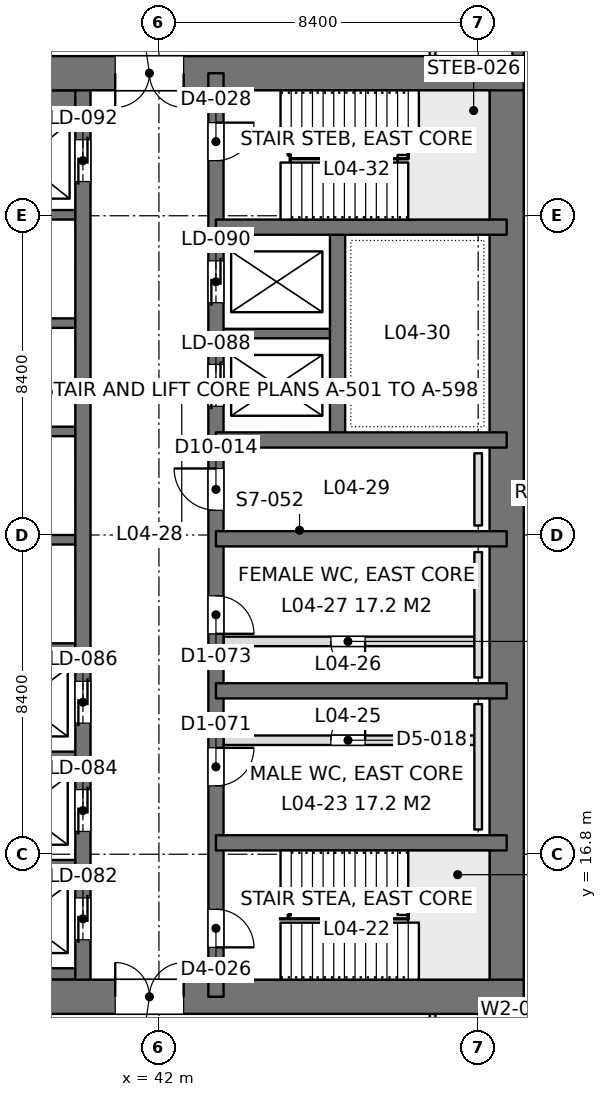
"""IFC4 building model, lengths in metres.
Left out: names, types, materials, properties, quantities, classifications, styles, units other than length and angle.
Written with IfcOpenShell. Run it as: python <this file> out.ifc"""

import sys

from ifc_helpers import new_model, si_unit, direction, frame, frame_2d, origin, place, context, subcontext, project, spatial, rectangle, extrude, element, fill, save


model = new_model("IFC4")
c1 = context("Model", 3, precision=1e-05, world=origin(), true_north=direction((0.0, 1.0)))
c2 = subcontext(c1, "Body", "Model", "MODEL_VIEW")
j1 = project(units=[si_unit("LENGTHUNIT", "METRE"), si_unit("PLANEANGLEUNIT", "RADIAN")], contexts=[c1])
p1 = place(None, origin())
s1 = spatial("IfcSite", under=j1, at=p1, CompositionType="ELEMENT")
p2 = place(p1, origin())
s2 = spatial("IfcBuilding", under=s1, at=p2, CompositionType="ELEMENT")
p3 = place(p2, frame((0.0, 0.0, 18.9)))
s3 = spatial("IfcBuildingStorey", under=s2, at=p3, CompositionType="ELEMENT", Elevation=18.9)
p4 = place(p3, frame((33.6, 13.05, 0.0), z_axis=(0.0, 0.0, 1.0), x_axis=(1.0, 0.0, 0.0)))
e1 = element("IfcWall", 1, at=p4, inside=s3, PredefinedType="SHEAR", context=c2, shape_type="SweptSolid", body=[
    extrude(rectangle(XDim=18.0, YDim=0.9, at=frame_2d((9.0, 0.0))), origin(), (0.0, 0.0, 1.0), 4.5),
])
p5 = place(p4, frame((7.25, 0.0, 0.0)))
e2 = element("IfcOpeningElement", 2, at=p5, cuts=e1, PredefinedType="OPENING", context=c2, shape_type="SweptSolid", body=[
    extrude(rectangle(XDim=1.8, YDim=2.4, at=frame_2d((0.9, 1.2))), frame((0.0, 0.46, 0.0), z_axis=(0.0, -1.0, 0.0), x_axis=(1.0, 0.0, 0.0)), (0.0, 0.0, 1.0), 0.92),
])
p6 = place(p3, frame((33.6, 37.35, 0.0), z_axis=(0.0, 0.0, 1.0), x_axis=(1.0, 0.0, 0.0)))
e3 = element("IfcWall", 3, at=p6, inside=s3, PredefinedType="SHEAR", context=c2, shape_type="SweptSolid", body=[
    extrude(rectangle(XDim=18.0, YDim=0.9, at=frame_2d((9.0, 0.0))), origin(), (0.0, 0.0, 1.0), 4.5),
])
p7 = place(p6, frame((7.25, 0.0, 0.0)))
e4 = element("IfcOpeningElement", 4, at=p7, cuts=e3, PredefinedType="OPENING", context=c2, shape_type="SweptSolid", body=[
    extrude(rectangle(XDim=1.8, YDim=2.4, at=frame_2d((0.9, 1.2))), frame((0.0, 0.46, 0.0), z_axis=(0.0, -1.0, 0.0), x_axis=(1.0, 0.0, 0.0)), (0.0, 0.0, 1.0), 0.92),
])
p8 = place(p3, frame((51.15, 13.05, 0.0), z_axis=(0.0, 0.0, 1.0), x_axis=(0.0, 1.0, 0.0)))
e5 = element("IfcWall", 5, at=p8, inside=s3, PredefinedType="SHEAR", context=c2, shape_type="SweptSolid", body=[
    extrude(rectangle(XDim=24.3, YDim=0.9, at=frame_2d((12.15, 0.0))), origin(), (0.0, 0.0, 1.0), 4.5),
])
p9 = place(p3, frame((43.5, 13.05, 0.0), z_axis=(0.0, 0.0, 1.0), x_axis=(0.0, 1.0, 0.0)))
e6 = element("IfcWall", 6, at=p9, inside=s3, PredefinedType="SHEAR", context=c2, shape_type="SweptSolid", body=[
    extrude(rectangle(XDim=24.3, YDim=0.4, at=frame_2d((12.15, 0.0))), origin(), (0.0, 0.0, 1.0), 4.5),
])
p10 = place(p9, frame((1.3, 0.0, 0.0)))
e7 = element("IfcOpeningElement", 7, at=p10, cuts=e6, PredefinedType="OPENING", context=c2, shape_type="SweptSolid", body=[
    extrude(rectangle(XDim=1.0, YDim=2.2, at=frame_2d((0.5, 1.1))), frame((0.0, 0.21, 0.0), z_axis=(0.0, -1.0, 0.0), x_axis=(1.0, 0.0, 0.0)), (0.0, 0.0, 1.0), 0.42),
])
p11 = place(p9, frame((22.0, 0.0, 0.0)))
e8 = element("IfcOpeningElement", 8, at=p11, cuts=e6, PredefinedType="OPENING", context=c2, shape_type="SweptSolid", body=[
    extrude(rectangle(XDim=1.0, YDim=2.2, at=frame_2d((0.5, 1.1))), frame((0.0, 0.21, 0.0), z_axis=(0.0, -1.0, 0.0), x_axis=(1.0, 0.0, 0.0)), (0.0, 0.0, 1.0), 0.42),
])
p12 = place(p9, frame((5.55, 0.0, 0.0)))
e9 = element("IfcOpeningElement", 9, at=p12, cuts=e6, PredefinedType="OPENING", context=c2, shape_type="SweptSolid", body=[
    extrude(rectangle(XDim=1.0, YDim=2.2, at=frame_2d((0.5, 1.1))), frame((0.0, 0.21, 0.0), z_axis=(0.0, -1.0, 0.0), x_axis=(1.0, 0.0, 0.0)), (0.0, 0.0, 1.0), 0.42),
])
p13 = place(p9, frame((9.55, 0.0, 0.0)))
e10 = element("IfcOpeningElement", 10, at=p13, cuts=e6, PredefinedType="OPENING", context=c2, shape_type="SweptSolid", body=[
    extrude(rectangle(XDim=1.0, YDim=2.2, at=frame_2d((0.5, 1.1))), frame((0.0, 0.21, 0.0), z_axis=(0.0, -1.0, 0.0), x_axis=(1.0, 0.0, 0.0)), (0.0, 0.0, 1.0), 0.42),
])
p14 = place(p9, frame((12.8, 0.0, 0.0)))
e11 = element("IfcOpeningElement", 11, at=p14, cuts=e6, PredefinedType="OPENING", context=c2, shape_type="SweptSolid", body=[
    extrude(rectangle(XDim=1.1, YDim=2.2, at=frame_2d((0.55, 1.1))), frame((0.0, 0.21, 0.0), z_axis=(0.0, -1.0, 0.0), x_axis=(1.0, 0.0, 0.0)), (0.0, 0.0, 1.0), 0.42),
])
p15 = place(p9, frame((15.538, 0.0, 0.0)))
e12 = element("IfcOpeningElement", 12, at=p15, cuts=e6, PredefinedType="OPENING", context=c2, shape_type="SweptSolid", body=[
    extrude(rectangle(XDim=1.1, YDim=2.2, at=frame_2d((0.55, 1.1))), frame((0.0, 0.21, 0.0), z_axis=(0.0, -1.0, 0.0), x_axis=(1.0, 0.0, 0.0)), (0.0, 0.0, 1.0), 0.42),
])
p16 = place(p9, frame((18.262, 0.0, 0.0)))
e13 = element("IfcOpeningElement", 13, at=p16, cuts=e6, PredefinedType="OPENING", context=c2, shape_type="SweptSolid", body=[
    extrude(rectangle(XDim=1.1, YDim=2.2, at=frame_2d((0.55, 1.1))), frame((0.0, 0.21, 0.0), z_axis=(0.0, -1.0, 0.0), x_axis=(1.0, 0.0, 0.0)), (0.0, 0.0, 1.0), 0.42),
])
p17 = place(p3, frame((40.0, 13.05, 0.0), z_axis=(0.0, 0.0, 1.0), x_axis=(0.0, 1.0, 0.0)))
e14 = element("IfcWall", 14, at=p17, inside=s3, PredefinedType="SHEAR", context=c2, shape_type="SweptSolid", body=[
    extrude(rectangle(XDim=24.3, YDim=0.4, at=frame_2d((12.15, 0.0))), origin(), (0.0, 0.0, 1.0), 4.5),
])
p18 = place(p17, frame((1.5, 0.0, 0.0)))
e15 = element("IfcOpeningElement", 15, at=p18, cuts=e14, PredefinedType="OPENING", context=c2, shape_type="SweptSolid", body=[
    extrude(rectangle(XDim=1.1, YDim=2.2, at=frame_2d((0.55, 1.1))), frame((0.0, 0.21, 0.0), z_axis=(0.0, -1.0, 0.0), x_axis=(1.0, 0.0, 0.0)), (0.0, 0.0, 1.0), 0.42),
])
p19 = place(p17, frame((4.35, 0.0, 0.0)))
e16 = element("IfcOpeningElement", 16, at=p19, cuts=e14, PredefinedType="OPENING", context=c2, shape_type="SweptSolid", body=[
    extrude(rectangle(XDim=1.1, YDim=2.2, at=frame_2d((0.55, 1.1))), frame((0.0, 0.21, 0.0), z_axis=(0.0, -1.0, 0.0), x_axis=(1.0, 0.0, 0.0)), (0.0, 0.0, 1.0), 0.42),
])
p20 = place(p17, frame((7.2, 0.0, 0.0)))
e17 = element("IfcOpeningElement", 17, at=p20, cuts=e14, PredefinedType="OPENING", context=c2, shape_type="SweptSolid", body=[
    extrude(rectangle(XDim=1.1, YDim=2.2, at=frame_2d((0.55, 1.1))), frame((0.0, 0.21, 0.0), z_axis=(0.0, -1.0, 0.0), x_axis=(1.0, 0.0, 0.0)), (0.0, 0.0, 1.0), 0.42),
])
p21 = place(p17, frame((21.45, 0.0, 0.0)))
e18 = element("IfcOpeningElement", 18, at=p21, cuts=e14, PredefinedType="OPENING", context=c2, shape_type="SweptSolid", body=[
    extrude(rectangle(XDim=1.1, YDim=2.2, at=frame_2d((0.55, 1.1))), frame((0.0, 0.21, 0.0), z_axis=(0.0, -1.0, 0.0), x_axis=(1.0, 0.0, 0.0)), (0.0, 0.0, 1.0), 0.42),
])
for number, where, z_axis, x_axis in (
    (19, (51.15, 17.1, 0.0), (0.0, 0.0, 1.0), (-1.0, 0.0, 0.0)),
    (20, (51.15, 21.1, 0.0), (0.0, 0.0, 1.0), (-1.0, 0.0, 0.0)),
    (21, (51.15, 25.1, 0.0), (0.0, 0.0, 1.0), (-1.0, 0.0, 0.0)),
    (22, (51.15, 27.7, 0.0), (0.0, 0.0, 1.0), (-1.0, 0.0, 0.0)),
    (23, (51.15, 33.3, 0.0), (0.0, 0.0, 1.0), (-1.0, 0.0, 0.0)),
):
    element("IfcWall", number, at=place(p3, frame(where, z_axis=z_axis, x_axis=x_axis)), inside=s3, PredefinedType="SHEAR", context=c2, shape_type="SweptSolid", body=[
        extrude(rectangle(XDim=7.65, YDim=0.4, at=frame_2d((3.825, 0.0))), origin(), (0.0, 0.0, 1.0), 4.5),
    ])
p22 = place(p3, frame((46.7, 27.7, 0.0), z_axis=(0.0, 0.0, 1.0), x_axis=(0.0, 1.0, 0.0)))
e24 = element("IfcWall", 24, at=p22, inside=s3, PredefinedType="SHEAR", context=c2, shape_type="SweptSolid", body=[
    extrude(rectangle(XDim=5.6, YDim=0.4, at=frame_2d((2.8, 0.0))), origin(), (0.0, 0.0, 1.0), 4.5),
])
p23 = place(p3, frame((46.7, 30.5, 0.0), z_axis=(0.0, 0.0, 1.0), x_axis=(-1.0, 0.0, 0.0)))
e25 = element("IfcWall", 25, at=p23, inside=s3, PredefinedType="SHEAR", context=c2, shape_type="SweptSolid", body=[
    extrude(rectangle(XDim=3.2, YDim=0.25, at=frame_2d((1.6, 0.0))), origin(), (0.0, 0.0, 1.0), 4.5),
])
p24 = place(p3, frame((40.0, 13.65, 0.0), z_axis=(0.0, 0.0, 1.0), x_axis=(-1.0, 0.0, 0.0)))
e26 = element("IfcWall", 26, at=p24, inside=s3, PredefinedType="SHEAR", context=c2, shape_type="SweptSolid", body=[
    extrude(rectangle(XDim=3.2, YDim=0.3, at=frame_2d((1.6, 0.0))), origin(), (0.0, 0.0, 1.0), 4.5),
])
for number, where, z_axis, x_axis in (
    (27, (40.0, 16.525, 0.0), (0.0, 0.0, 1.0), (-1.0, 0.0, 0.0)),
    (28, (40.0, 19.375, 0.0), (0.0, 0.0, 1.0), (-1.0, 0.0, 0.0)),
    (29, (40.0, 22.225, 0.0), (0.0, 0.0, 1.0), (-1.0, 0.0, 0.0)),
    (30, (40.0, 25.075, 0.0), (0.0, 0.0, 1.0), (-1.0, 0.0, 0.0)),
    (31, (40.0, 27.925, 0.0), (0.0, 0.0, 1.0), (-1.0, 0.0, 0.0)),
    (32, (40.0, 30.775, 0.0), (0.0, 0.0, 1.0), (-1.0, 0.0, 0.0)),
    (33, (40.0, 33.625, 0.0), (0.0, 0.0, 1.0), (-1.0, 0.0, 0.0)),
):
    element("IfcWall", number, at=place(p3, frame(where, z_axis=z_axis, x_axis=x_axis)), inside=s3, PredefinedType="SHEAR", context=c2, shape_type="SweptSolid", body=[
        extrude(rectangle(XDim=3.2, YDim=0.25, at=frame_2d((1.6, 0.0))), origin(), (0.0, 0.0, 1.0), 4.5),
    ])
p25 = place(p3, frame((40.0, 36.625, 0.0), z_axis=(0.0, 0.0, 1.0), x_axis=(-1.0, 0.0, 0.0)))
e34 = element("IfcWall", 34, at=p25, inside=s3, PredefinedType="SHEAR", context=c2, shape_type="SweptSolid", body=[
    extrude(rectangle(XDim=3.2, YDim=0.55, at=frame_2d((1.6, 0.0))), origin(), (0.0, 0.0, 1.0), 4.5),
])
p26 = place(p3, frame((51.45, 42.0, 0.0), z_axis=(0.0, 0.0, 1.0), x_axis=(0.0, -1.0, 0.0)))
e35 = element("IfcWall", 35, at=p26, inside=s3, PredefinedType="SOLIDWALL", context=c2, shape_type="SweptSolid", body=[
    extrude(rectangle(XDim=4.2, YDim=0.3, at=frame_2d((2.1, 0.0))), origin(), (0.0, 0.0, 1.0), 4.34),
])
p27 = place(p26, frame((0.9, 0.0, 0.9)))
e36 = element("IfcOpeningElement", 36, at=p27, cuts=e35, PredefinedType="OPENING", context=c2, shape_type="SweptSolid", body=[
    extrude(rectangle(XDim=2.4, YDim=1.9, at=frame_2d((1.2, 0.95))), frame((0.0, 0.16, 0.0), z_axis=(0.0, -1.0, 0.0), x_axis=(1.0, 0.0, 0.0)), (0.0, 0.0, 1.0), 0.32),
])
p28 = place(p3, frame((51.45, 12.6, 0.0), z_axis=(0.0, 0.0, 1.0), x_axis=(0.0, -1.0, 0.0)))
e37 = element("IfcWall", 37, at=p28, inside=s3, PredefinedType="SOLIDWALL", context=c2, shape_type="SweptSolid", body=[
    extrude(rectangle(XDim=4.2, YDim=0.3, at=frame_2d((2.1, 0.0))), origin(), (0.0, 0.0, 1.0), 4.34),
])
p29 = place(p28, frame((0.9, 0.0, 0.9)))
e38 = element("IfcOpeningElement", 38, at=p29, cuts=e37, PredefinedType="OPENING", context=c2, shape_type="SweptSolid", body=[
    extrude(rectangle(XDim=2.4, YDim=1.9, at=frame_2d((1.2, 0.95))), frame((0.0, 0.16, 0.0), z_axis=(0.0, -1.0, 0.0), x_axis=(1.0, 0.0, 0.0)), (0.0, 0.0, 1.0), 0.32),
])
p30 = place(p3, frame((49.2, 10.8, 0.0), z_axis=(0.0, 0.0, 1.0), x_axis=(0.0, 1.0, 0.0)))
e39 = element("IfcWall", 39, at=p30, inside=s3, PredefinedType="PARTITIONING", context=c2, shape_type="SweptSolid", body=[
    extrude(rectangle(XDim=1.802, YDim=0.15, at=frame_2d((0.901, 0.0))), origin(), (0.0, 0.0, 1.0), 4.34),
])
p31 = place(p3, frame((49.2, 37.8, 0.0), z_axis=(0.0, 0.0, 1.0), x_axis=(0.0, 1.0, 0.0)))
e40 = element("IfcWall", 40, at=p31, inside=s3, PredefinedType="PARTITIONING", context=c2, shape_type="SweptSolid", body=[
    extrude(rectangle(XDim=1.8, YDim=0.15, at=frame_2d((0.9, 0.0))), origin(), (0.0, 0.0, 1.0), 4.34),
])
p32 = place(p3, frame((43.7, 22.4, 0.0), z_axis=(0.0, 0.0, 1.0), x_axis=(1.0, 0.0, 0.0)))
e41 = element("IfcWall", 41, at=p32, inside=s3, PredefinedType="PARTITIONING", context=c2, shape_type="SweptSolid", body=[
    extrude(rectangle(XDim=6.6, YDim=0.25, at=frame_2d((3.3, 0.0))), origin(), (0.0, 0.0, 1.0), 4.3),
])
p33 = place(p32, frame((2.825, 0.0, 0.0)))
e42 = element("IfcOpeningElement", 42, at=p33, cuts=e41, PredefinedType="OPENING", context=c2, shape_type="SweptSolid", body=[
    extrude(rectangle(XDim=0.9, YDim=2.2, at=frame_2d((0.45, 1.1))), frame((0.0, 0.135, 0.0), z_axis=(0.0, -1.0, 0.0), x_axis=(1.0, 0.0, 0.0)), (0.0, 0.0, 1.0), 0.27),
])
p34 = place(p3, frame((43.7, 19.8, 0.0), z_axis=(0.0, 0.0, 1.0), x_axis=(1.0, 0.0, 0.0)))
e43 = element("IfcWall", 43, at=p34, inside=s3, PredefinedType="PARTITIONING", context=c2, shape_type="SweptSolid", body=[
    extrude(rectangle(XDim=6.6, YDim=0.25, at=frame_2d((3.3, 0.0))), origin(), (0.0, 0.0, 1.0), 4.3),
])
p35 = place(p34, frame((2.825, 0.0, 0.0)))
e44 = element("IfcOpeningElement", 44, at=p35, cuts=e43, PredefinedType="OPENING", context=c2, shape_type="SweptSolid", body=[
    extrude(rectangle(XDim=0.9, YDim=2.2, at=frame_2d((0.45, 1.1))), frame((0.0, 0.135, 0.0), z_axis=(0.0, -1.0, 0.0), x_axis=(1.0, 0.0, 0.0)), (0.0, 0.0, 1.0), 0.27),
])
for number, where, z_axis, x_axis in (
    (45, (50.4, 17.45, 0.0), (0.0, 0.0, 1.0), (0.0, 1.0, 0.0)),
    (46, (50.4, 21.45, 0.0), (0.0, 0.0, 1.0), (0.0, 1.0, 0.0)),
):
    element("IfcWall", number, at=place(p3, frame(where, z_axis=z_axis, x_axis=x_axis)), inside=s3, PredefinedType="PLUMBINGWALL", context=c2, shape_type="SweptSolid", body=[
        extrude(rectangle(XDim=3.3, YDim=0.2, at=frame_2d((1.65, 0.0))), origin(), (0.0, 0.0, 1.0), 1.2),
    ])
p36 = place(p3, frame((50.4, 25.45, 0.0), z_axis=(0.0, 0.0, 1.0), x_axis=(0.0, 1.0, 0.0)))
e47 = element("IfcWall", 47, at=p36, inside=s3, PredefinedType="PLUMBINGWALL", context=c2, shape_type="SweptSolid", body=[
    extrude(rectangle(XDim=1.9, YDim=0.2, at=frame_2d((0.95, 0.0))), origin(), (0.0, 0.0, 1.0), 1.2),
])
p37 = place(p5, origin())
e48 = element("IfcDoor", 48, at=p37, inside=s3, OperationType="DOUBLE_DOOR_SINGLE_SWING", PredefinedType="DOOR", context=c2, shape_type="SweptSolid", body=[
    extrude(rectangle(XDim=1.8, YDim=2.4, at=frame_2d((0.9, 1.2))), frame((0.0, 0.025, 0.0), z_axis=(0.0, -1.0, 0.0), x_axis=(1.0, 0.0, 0.0)), (0.0, 0.0, 1.0), 0.05),
])
fill(e2, e48)
p38 = place(p7, frame((1.8, 0.0, 0.0), z_axis=(0.0, 0.0, 1.0), x_axis=(-1.0, 0.0, 0.0)))
e49 = element("IfcDoor", 49, at=p38, inside=s3, OperationType="DOUBLE_DOOR_SINGLE_SWING", PredefinedType="DOOR", context=c2, shape_type="SweptSolid", body=[
    extrude(rectangle(XDim=1.8, YDim=2.4, at=frame_2d((0.9, 1.2))), frame((0.0, 0.025, 0.0), z_axis=(0.0, -1.0, 0.0), x_axis=(1.0, 0.0, 0.0)), (0.0, 0.0, 1.0), 0.05),
])
fill(e4, e49)
p39 = place(p10, frame((1.0, 0.0, 0.0), z_axis=(0.0, 0.0, 1.0), x_axis=(-1.0, 0.0, 0.0)))
e50 = element("IfcDoor", 50, at=p39, inside=s3, OperationType="SINGLE_SWING_RIGHT", PredefinedType="DOOR", context=c2, shape_type="SweptSolid", body=[
    extrude(rectangle(XDim=1.0, YDim=2.2, at=frame_2d((0.5, 1.1))), frame((0.0, 0.025, 0.0), z_axis=(0.0, -1.0, 0.0), x_axis=(1.0, 0.0, 0.0)), (0.0, 0.0, 1.0), 0.05),
])
fill(e7, e50)
p40 = place(p11, frame((1.0, 0.0, 0.0), z_axis=(0.0, 0.0, 1.0), x_axis=(-1.0, 0.0, 0.0)))
e51 = element("IfcDoor", 51, at=p40, inside=s3, OperationType="SINGLE_SWING_LEFT", PredefinedType="DOOR", context=c2, shape_type="SweptSolid", body=[
    extrude(rectangle(XDim=1.0, YDim=2.2, at=frame_2d((0.5, 1.1))), frame((0.0, 0.025, 0.0), z_axis=(0.0, -1.0, 0.0), x_axis=(1.0, 0.0, 0.0)), (0.0, 0.0, 1.0), 0.05),
])
fill(e8, e51)
p41 = place(p12, frame((1.0, 0.0, 0.0), z_axis=(0.0, 0.0, 1.0), x_axis=(-1.0, 0.0, 0.0)))
e52 = element("IfcDoor", 52, at=p41, inside=s3, OperationType="SINGLE_SWING_LEFT", PredefinedType="DOOR", context=c2, shape_type="SweptSolid", body=[
    extrude(rectangle(XDim=1.0, YDim=2.2, at=frame_2d((0.5, 1.1))), frame((0.0, 0.025, 0.0), z_axis=(0.0, -1.0, 0.0), x_axis=(1.0, 0.0, 0.0)), (0.0, 0.0, 1.0), 0.05),
])
fill(e9, e52)
p42 = place(p13, frame((1.0, 0.0, 0.0), z_axis=(0.0, 0.0, 1.0), x_axis=(-1.0, 0.0, 0.0)))
e53 = element("IfcDoor", 53, at=p42, inside=s3, OperationType="SINGLE_SWING_RIGHT", PredefinedType="DOOR", context=c2, shape_type="SweptSolid", body=[
    extrude(rectangle(XDim=1.0, YDim=2.2, at=frame_2d((0.5, 1.1))), frame((0.0, 0.025, 0.0), z_axis=(0.0, -1.0, 0.0), x_axis=(1.0, 0.0, 0.0)), (0.0, 0.0, 1.0), 0.05),
])
fill(e10, e53)
p43 = place(p14, origin())
e54 = element("IfcDoor", 54, at=p43, inside=s3, OperationType="SINGLE_SWING_RIGHT", PredefinedType="DOOR", context=c2, shape_type="SweptSolid", body=[
    extrude(rectangle(XDim=1.1, YDim=2.2, at=frame_2d((0.55, 1.1))), frame((0.0, 0.025, 0.0), z_axis=(0.0, -1.0, 0.0), x_axis=(1.0, 0.0, 0.0)), (0.0, 0.0, 1.0), 0.05),
])
fill(e11, e54)
p44 = place(p18, origin())
e55 = element("IfcDoor", 55, at=p44, inside=s3, OperationType="DOUBLE_DOOR_SLIDING", PredefinedType="DOOR", context=c2, shape_type="SweptSolid", body=[
    extrude(rectangle(XDim=1.1, YDim=2.2, at=frame_2d((0.55, 1.1))), frame((0.0, 0.025, 0.0), z_axis=(0.0, -1.0, 0.0), x_axis=(1.0, 0.0, 0.0)), (0.0, 0.0, 1.0), 0.05),
])
fill(e15, e55)
p45 = place(p19, origin())
e56 = element("IfcDoor", 56, at=p45, inside=s3, OperationType="DOUBLE_DOOR_SLIDING", PredefinedType="DOOR", context=c2, shape_type="SweptSolid", body=[
    extrude(rectangle(XDim=1.1, YDim=2.2, at=frame_2d((0.55, 1.1))), frame((0.0, 0.025, 0.0), z_axis=(0.0, -1.0, 0.0), x_axis=(1.0, 0.0, 0.0)), (0.0, 0.0, 1.0), 0.05),
])
fill(e16, e56)
p46 = place(p20, origin())
e57 = element("IfcDoor", 57, at=p46, inside=s3, OperationType="DOUBLE_DOOR_SLIDING", PredefinedType="DOOR", context=c2, shape_type="SweptSolid", body=[
    extrude(rectangle(XDim=1.1, YDim=2.2, at=frame_2d((0.55, 1.1))), frame((0.0, 0.025, 0.0), z_axis=(0.0, -1.0, 0.0), x_axis=(1.0, 0.0, 0.0)), (0.0, 0.0, 1.0), 0.05),
])
fill(e17, e57)
p47 = place(p21, origin())
e58 = element("IfcDoor", 58, at=p47, inside=s3, OperationType="DOUBLE_DOOR_SLIDING", PredefinedType="DOOR", context=c2, shape_type="SweptSolid", body=[
    extrude(rectangle(XDim=1.1, YDim=2.2, at=frame_2d((0.55, 1.1))), frame((0.0, 0.025, 0.0), z_axis=(0.0, -1.0, 0.0), x_axis=(1.0, 0.0, 0.0)), (0.0, 0.0, 1.0), 0.05),
])
fill(e18, e58)
p48 = place(p15, origin())
e59 = element("IfcDoor", 59, at=p48, inside=s3, OperationType="DOUBLE_DOOR_SLIDING", PredefinedType="DOOR", context=c2, shape_type="SweptSolid", body=[
    extrude(rectangle(XDim=1.1, YDim=2.2, at=frame_2d((0.55, 1.1))), frame((0.0, 0.025, 0.0), z_axis=(0.0, -1.0, 0.0), x_axis=(1.0, 0.0, 0.0)), (0.0, 0.0, 1.0), 0.05),
])
fill(e12, e59)
p49 = place(p16, origin())
e60 = element("IfcDoor", 60, at=p49, inside=s3, OperationType="DOUBLE_DOOR_SLIDING", PredefinedType="DOOR", context=c2, shape_type="SweptSolid", body=[
    extrude(rectangle(XDim=1.1, YDim=2.2, at=frame_2d((0.55, 1.1))), frame((0.0, 0.025, 0.0), z_axis=(0.0, -1.0, 0.0), x_axis=(1.0, 0.0, 0.0)), (0.0, 0.0, 1.0), 0.05),
])
fill(e13, e60)
p50 = place(p33, frame((0.9, 0.0, 0.0), z_axis=(0.0, 0.0, 1.0), x_axis=(-1.0, 0.0, 0.0)))
e61 = element("IfcDoor", 61, at=p50, inside=s3, OperationType="SINGLE_SWING_LEFT", PredefinedType="DOOR", context=c2, shape_type="SweptSolid", body=[
    extrude(rectangle(XDim=0.9, YDim=2.2, at=frame_2d((0.45, 1.1))), frame((0.0, 0.025, 0.0), z_axis=(0.0, -1.0, 0.0), x_axis=(1.0, 0.0, 0.0)), (0.0, 0.0, 1.0), 0.05),
])
fill(e42, e61)
p51 = place(p35, origin())
e62 = element("IfcDoor", 62, at=p51, inside=s3, OperationType="SINGLE_SWING_RIGHT", PredefinedType="DOOR", context=c2, shape_type="SweptSolid", body=[
    extrude(rectangle(XDim=0.9, YDim=2.2, at=frame_2d((0.45, 1.1))), frame((0.0, 0.025, 0.0), z_axis=(0.0, -1.0, 0.0), x_axis=(1.0, 0.0, 0.0)), (0.0, 0.0, 1.0), 0.05),
])
fill(e44, e62)
save(model, sys.argv[1])
